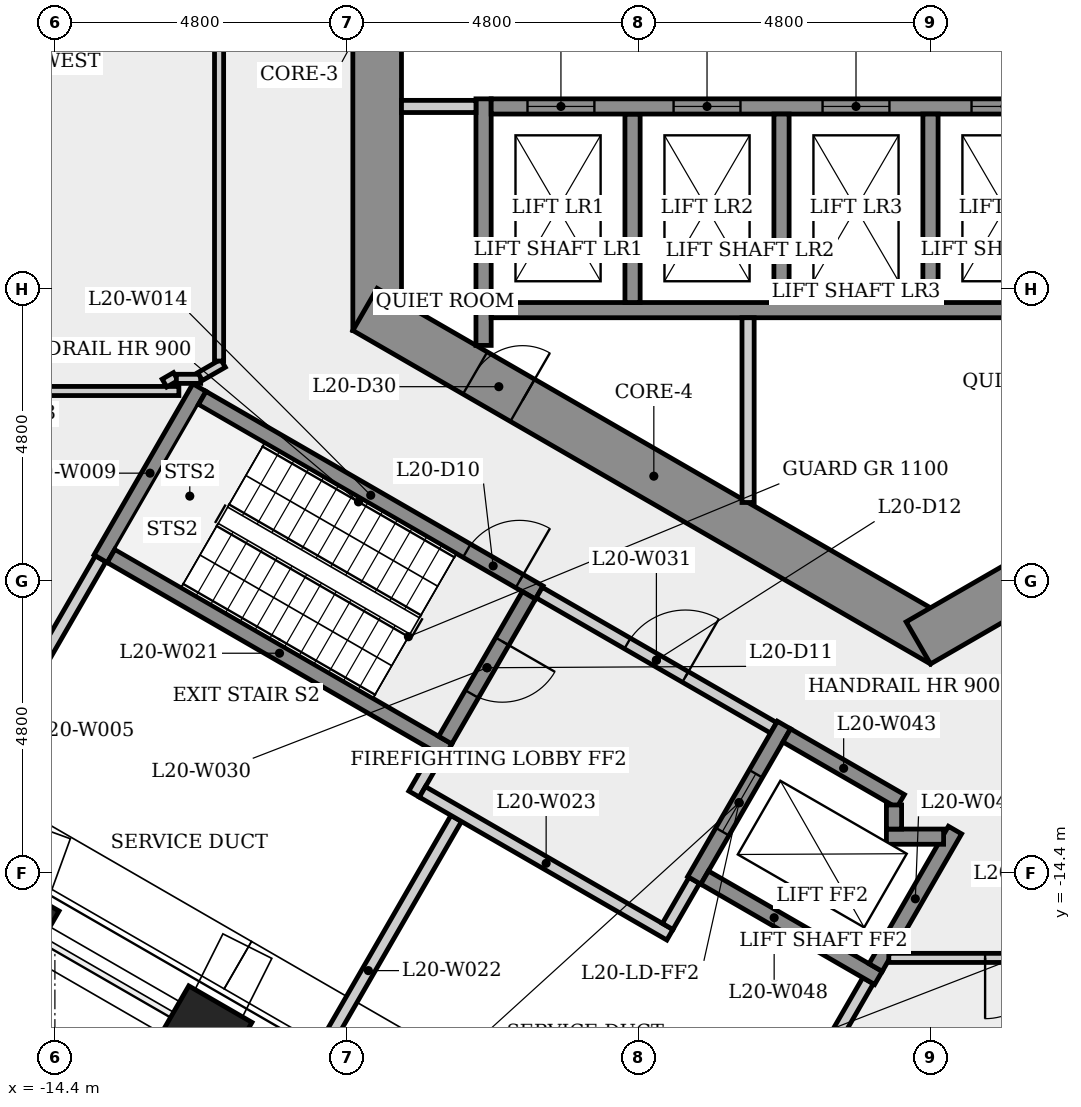
"""IFC4 building model, lengths in metres.
Left out: names, types, materials, properties, quantities, classifications, styles, units other than length and angle.
Written with IfcOpenShell. Run it as: python <this file> out.ifc"""

import sys

from ifc_helpers import new_model, si_unit, direction, frame, frame_2d, origin, origin_2d, place, context, subcontext, project, spatial, rectangle, extrude, element, fill, save


model = new_model("IFC4")
c1 = context("Model", 3, precision=1e-05, world=origin(), true_north=direction((0.0, 1.0)))
c2 = subcontext(c1, "Body", "Model", "MODEL_VIEW")
j1 = project(units=[si_unit("LENGTHUNIT", "METRE"), si_unit("PLANEANGLEUNIT", "RADIAN")], contexts=[c1])
p1 = place(None, origin())
s1 = spatial("IfcSite", under=j1, at=p1, CompositionType="ELEMENT")
p2 = place(p1, origin())
s2 = spatial("IfcBuilding", under=s1, at=p2, CompositionType="ELEMENT")
p3 = place(p2, frame((0.0, 0.0, 78.3)))
s3 = spatial("IfcBuildingStorey", under=s2, at=p3, CompositionType="ELEMENT", Elevation=78.3)
p4 = place(p3, frame((-9.1, 5.485, 0.0), z_axis=(0.0, 0.0, 1.0), x_axis=(0.0, -1.0, 0.0)))
e1 = element("IfcWall", 1, at=p4, inside=s3, PredefinedType="SHEAR", context=c2, shape_type="SweptSolid", body=[
    extrude(rectangle(XDim=10.97, YDim=0.8, at=frame_2d((5.485, 0.0))), origin(), (0.0, 0.0, 1.0), 4.8),
])
p5 = place(p4, frame((4.685, 0.0, 0.0)))
e2 = element("IfcOpeningElement", 2, at=p5, cuts=e1, PredefinedType="OPENING", context=c2, shape_type="SweptSolid", body=[
    extrude(rectangle(XDim=1.6, YDim=2.1, at=frame_2d((0.8, 1.05))), frame((0.0, 0.41, 0.0), z_axis=(0.0, -1.0, 0.0), x_axis=(1.0, 0.0, 0.0)), (0.0, 0.0, 1.0), 0.82),
])
p6 = place(p3, frame((-9.3, -5.138, 0.0), z_axis=(0.0, 0.0, 1.0), x_axis=(0.866023993627, -0.500002442456, 0.0)))
e3 = element("IfcWall", 3, at=p6, inside=s3, PredefinedType="SHEAR", context=c2, shape_type="SweptSolid", body=[
    extrude(rectangle(XDim=10.97, YDim=0.8, at=frame_2d((5.485, 0.0))), origin(), (0.0, 0.0, 1.0), 4.8),
])
p7 = place(p6, frame((2.091, 0.0, 0.0)))
e4 = element("IfcOpeningElement", 4, at=p7, cuts=e3, PredefinedType="OPENING", context=c2, shape_type="SweptSolid", body=[
    extrude(rectangle(XDim=0.9, YDim=2.1, at=frame_2d((0.45, 1.05))), frame((0.0, 0.41, 0.0), z_axis=(0.0, -1.0, 0.0), x_axis=(1.0, 0.0, 0.0)), (0.0, 0.0, 1.0), 0.82),
])
p8 = place(p3, frame((-0.2, -10.623, 0.0), z_axis=(0.0, 0.0, 1.0), x_axis=(0.866023993627, 0.500002442456, 0.0)))
e5 = element("IfcWall", 5, at=p8, inside=s3, PredefinedType="SHEAR", context=c2, shape_type="SweptSolid", body=[
    extrude(rectangle(XDim=10.97, YDim=0.8, at=frame_2d((5.485, 0.0))), origin(), (0.0, 0.0, 1.0), 4.8),
])
p9 = place(p8, frame((4.914, 0.0, 0.0)))
e6 = element("IfcOpeningElement", 6, at=p9, cuts=e5, PredefinedType="OPENING", context=c2, shape_type="SweptSolid", body=[
    extrude(rectangle(XDim=0.9, YDim=2.1, at=frame_2d((0.45, 1.05))), frame((0.0, 0.41, 0.0), z_axis=(0.0, -1.0, 0.0), x_axis=(1.0, 0.0, 0.0)), (0.0, 0.0, 1.0), 0.82),
])
for number, where, z_axis, x_axis in (
    (7, (-15.151, -15.252, 0.0), (0.0, 0.0, 1.0), (-0.5, -0.866, 0.0)),
    (8, (-11.979, -17.084, 0.0), (0.0, 0.0, 1.0), (-0.5, -0.866, 0.0)),
):
    element("IfcColumn", number, at=place(p3, frame(where, z_axis=z_axis, x_axis=x_axis)), inside=s3, PredefinedType="COLUMN", context=c2, shape_type="SweptSolid", body=[
        extrude(rectangle(XDim=1.2, YDim=1.2, at=origin_2d()), origin(), (0.0, 0.0, 1.0), 4.45),
    ])
p10 = place(p3, frame((-18.046, -6.48, 0.0), z_axis=(0.0, 0.0, 1.0), x_axis=(1.0, 0.0, 0.0)))
e9 = element("IfcWall", 9, at=p10, inside=s3, PredefinedType="PARTITIONING", context=c2, shape_type="SweptSolid", body=[
    extrude(rectangle(XDim=5.685, YDim=0.15, at=frame_2d((2.843, 0.0))), origin(), (0.0, 0.0, 1.0), 4.45),
])
p11 = place(p3, frame((-16.926, -14.916, 0.0), z_axis=(0.0, 0.0, 1.0), x_axis=(0.499992165211, 0.866029927155, 0.0)))
e10 = element("IfcWall", 10, at=p11, inside=s3, PredefinedType="PLUMBINGWALL", context=c2, shape_type="SweptSolid", body=[
    extrude(rectangle(XDim=6.556, YDim=0.2, at=frame_2d((3.278, 0.0))), origin(), (0.0, 0.0, 1.0), 4.45),
])
p12 = place(p3, frame((-13.648, -9.239, 0.0), z_axis=(0.0, 0.0, 1.0), x_axis=(0.500017246033, 0.866015446554, 0.0)))
e11 = element("IfcWall", 11, at=p12, inside=s3, PredefinedType="SHEAR", context=c2, shape_type="SweptSolid", body=[
    extrude(rectangle(XDim=3.25, YDim=0.25, at=frame_2d((1.625, 0.0))), origin(), (0.0, 0.0, 1.0), 4.45),
])
p13 = place(p3, frame((-12.598, -6.35, 0.0), z_axis=(0.0, 0.0, 1.0), x_axis=(0.865919906206, 0.500182682664, 0.0)))
e12 = element("IfcWall", 12, at=p13, inside=s3, PredefinedType="PARTITIONING", context=c2, shape_type="SweptSolid", body=[
    extrude(rectangle(XDim=0.214, YDim=0.15, at=frame_2d((0.107, 0.0))), origin(), (0.0, 0.0, 1.0), 4.45),
])
p14 = place(p3, frame((-12.402, -6.28, 0.0), z_axis=(0.0, 0.0, 1.0), x_axis=(1.0, 0.0, 0.0)))
e13 = element("IfcWall", 13, at=p14, inside=s3, PredefinedType="PARTITIONING", context=c2, shape_type="SweptSolid", body=[
    extrude(rectangle(XDim=0.4, YDim=0.15, at=frame_2d((0.2, 0.0))), origin(), (0.0, 0.0, 1.0), 4.45),
])
p15 = place(p3, frame((-11.977, -6.595, 0.0), z_axis=(0.0, 0.0, 1.0), x_axis=(0.866025499775, -0.499999833739, 0.0)))
e14 = element("IfcWall", 14, at=p15, inside=s3, PredefinedType="SHEAR", context=c2, shape_type="SweptSolid", body=[
    extrude(rectangle(XDim=6.4, YDim=0.25, at=frame_2d((3.2, 0.0))), origin(), (0.0, 0.0, 1.0), 4.45),
])
p16 = place(p15, frame((5.025, 0.0, 0.0)))
e15 = element("IfcOpeningElement", 15, at=p16, cuts=e14, PredefinedType="OPENING", context=c2, shape_type="SweptSolid", body=[
    extrude(rectangle(XDim=1.0, YDim=2.1, at=frame_2d((0.5, 1.05))), frame((0.0, 0.135, 0.0), z_axis=(0.0, -1.0, 0.0), x_axis=(1.0, 0.0, 0.0)), (0.0, 0.0, 1.0), 0.27),
])
p17 = place(p3, frame((-12.012, -6.242, 0.0), z_axis=(0.0, 0.0, 1.0), x_axis=(0.866166930732, 0.499754787977, 0.0)))
e16 = element("IfcWall", 16, at=p17, inside=s3, PredefinedType="PARTITIONING", context=c2, shape_type="SweptSolid", body=[
    extrude(rectangle(XDim=0.436, YDim=0.15, at=frame_2d((0.218, 0.0))), origin(), (0.0, 0.0, 1.0), 4.45),
])
p18 = place(p3, frame((-11.7, -5.987, 0.0), z_axis=(0.0, 0.0, 1.0), x_axis=(0.0, 1.0, 0.0)))
e17 = element("IfcWall", 17, at=p18, inside=s3, PredefinedType="PARTITIONING", context=c2, shape_type="SweptSolid", body=[
    extrude(rectangle(XDim=12.125, YDim=0.15, at=frame_2d((6.062, 0.0))), origin(), (0.0, 0.0, 1.0), 4.45),
])
p19 = place(p18, frame((5.225, 0.0, 0.0)))
e18 = element("IfcOpeningElement", 18, at=p19, cuts=e17, PredefinedType="OPENING", context=c2, shape_type="SweptSolid", body=[
    extrude(rectangle(XDim=1.6, YDim=2.1, at=frame_2d((0.8, 1.05))), frame((0.0, 0.085, 0.0), z_axis=(0.0, -1.0, 0.0), x_axis=(1.0, 0.0, 0.0)), (0.0, 0.0, 1.0), 0.17),
])
p20 = place(p3, frame((-8.493, -13.11, 0.0), z_axis=(0.0, 0.0, 1.0), x_axis=(0.500067724834, 0.865986299303, 0.0)))
e19 = element("IfcWall", 19, at=p20, inside=s3, PredefinedType="PLUMBINGWALL", context=c2, shape_type="SweptSolid", body=[
    extrude(rectangle(XDim=0.775, YDim=0.2, at=frame_2d((0.388, 0.0))), origin(), (0.0, 0.0, 1.0), 4.45),
])
p21 = place(p3, frame((-7.935, -12.393, 0.0), z_axis=(0.0, 0.0, 1.0), x_axis=(-0.866025499775, 0.499999833739, 0.0)))
e20 = element("IfcWall", 20, at=p21, inside=s3, PredefinedType="SHEAR", context=c2, shape_type="SweptSolid", body=[
    extrude(rectangle(XDim=6.4, YDim=0.25, at=frame_2d((3.2, 0.0))), origin(), (0.0, 0.0, 1.0), 4.45),
])
p22 = place(p3, frame((-7.8, -13.51, 0.0), z_axis=(0.0, 0.0, 1.0), x_axis=(-0.499982030767, -0.866035778077, 0.0)))
e21 = element("IfcWall", 21, at=p22, inside=s3, PredefinedType="PLUMBINGWALL", context=c2, shape_type="SweptSolid", body=[
    extrude(rectangle(XDim=5.781, YDim=0.2, at=frame_2d((2.89, 0.0))), origin(), (0.0, 0.0, 1.0), 4.45),
])
p23 = place(p3, frame((-8.356, -13.073, 0.0), z_axis=(0.0, 0.0, 1.0), x_axis=(0.866038532462, -0.499977259774, 0.0)))
e22 = element("IfcWall", 22, at=p23, inside=s3, PredefinedType="PLUMBINGWALL", context=c2, shape_type="SweptSolid", body=[
    extrude(rectangle(XDim=4.7, YDim=0.2, at=frame_2d((2.35, 0.0))), origin(), (0.0, 0.0, 1.0), 4.45),
])
p24 = place(p3, frame((-7.35, -5.73, 0.0), z_axis=(0.0, 0.0, 1.0), x_axis=(0.0, 1.0, 0.0)))
e23 = element("IfcWall", 23, at=p24, inside=s3, PredefinedType="SHEAR", context=c2, shape_type="SweptSolid", body=[
    extrude(rectangle(XDim=4.055, YDim=0.25, at=frame_2d((2.028, 0.0))), origin(), (0.0, 0.0, 1.0), 4.45),
])
p25 = place(p3, frame((-7.475, -1.8, 0.0), z_axis=(0.0, 0.0, 1.0), x_axis=(-1.0, 0.0, 0.0)))
e24 = element("IfcWall", 24, at=p25, inside=s3, PredefinedType="PARTITIONING", context=c2, shape_type="SweptSolid", body=[
    extrude(rectangle(XDim=1.225, YDim=0.2, at=frame_2d((0.613, 0.0))), origin(), (0.0, 0.0, 1.0), 4.45),
])
p26 = place(p3, frame((-6.605, -9.841, 0.0), z_axis=(0.0, 0.0, 1.0), x_axis=(-0.499996545922, -0.866027397988, 0.0)))
e25 = element("IfcWall", 25, at=p26, inside=s3, PredefinedType="SHEAR", context=c2, shape_type="SweptSolid", body=[
    extrude(rectangle(XDim=2.75, YDim=0.25, at=frame_2d((1.375, 0.0))), origin(), (0.0, 0.0, 1.0), 4.45),
])
p27 = place(p26, frame((0.875, 0.0, 0.0)))
e26 = element("IfcOpeningElement", 26, at=p27, cuts=e25, PredefinedType="OPENING", context=c2, shape_type="SweptSolid", body=[
    extrude(rectangle(XDim=1.0, YDim=2.1, at=frame_2d((0.5, 1.05))), frame((0.0, 0.135, 0.0), z_axis=(0.0, -1.0, 0.0), x_axis=(1.0, 0.0, 0.0)), (0.0, 0.0, 1.0), 0.27),
])
p28 = place(p3, frame((-6.435, -9.795, 0.0), z_axis=(0.0, 0.0, 1.0), x_axis=(0.866012907634, -0.500021643343, 0.0)))
e27 = element("IfcWall", 27, at=p28, inside=s3, PredefinedType="PARTITIONING", context=c2, shape_type="SweptSolid", body=[
    extrude(rectangle(XDim=4.45, YDim=0.2, at=frame_2d((2.225, 0.0))), origin(), (0.0, 0.0, 1.0), 4.45),
])
p29 = place(p28, frame((1.675, 0.0, 0.0)))
e28 = element("IfcOpeningElement", 28, at=p29, cuts=e27, PredefinedType="OPENING", context=c2, shape_type="SweptSolid", body=[
    extrude(rectangle(XDim=1.1, YDim=2.1, at=frame_2d((0.55, 1.05))), frame((0.0, 0.11, 0.0), z_axis=(0.0, -1.0, 0.0), x_axis=(1.0, 0.0, 0.0)), (0.0, 0.0, 1.0), 0.22),
])
p30 = place(p3, frame((-7.225, -5.15, 0.0), z_axis=(0.0, 0.0, 1.0), x_axis=(1.0, 0.0, 0.0)))
e29 = element("IfcWall", 29, at=p30, inside=s3, PredefinedType="SHEAR", context=c2, shape_type="SweptSolid", body=[
    extrude(rectangle(XDim=14.7, YDim=0.25, at=frame_2d((7.35, 0.0))), origin(), (0.0, 0.0, 1.0), 4.45),
])
p31 = place(p3, frame((-4.9, -1.925, 0.0), z_axis=(0.0, 0.0, 1.0), x_axis=(0.0, -1.0, 0.0)))
e30 = element("IfcWall", 30, at=p31, inside=s3, PredefinedType="SHEAR", context=c2, shape_type="SweptSolid", body=[
    extrude(rectangle(XDim=3.1, YDim=0.25, at=frame_2d((1.55, 0.0))), origin(), (0.0, 0.0, 1.0), 4.8),
])
p32 = place(p3, frame((-7.225, -1.8, 0.0), z_axis=(0.0, 0.0, 1.0), x_axis=(1.0, 0.0, 0.0)))
e31 = element("IfcWall", 31, at=p32, inside=s3, PredefinedType="SHEAR", context=c2, shape_type="SweptSolid", body=[
    extrude(rectangle(XDim=14.7, YDim=0.25, at=frame_2d((7.35, 0.0))), origin(), (0.0, 0.0, 1.0), 4.45),
])
p33 = place(p32, frame((0.597, 0.0, 0.0)))
e32 = element("IfcOpeningElement", 32, at=p33, cuts=e31, PredefinedType="OPENING", context=c2, shape_type="SweptSolid", body=[
    extrude(rectangle(XDim=1.1, YDim=2.1, at=frame_2d((0.55, 1.05))), frame((0.0, 0.135, 0.0), z_axis=(0.0, -1.0, 0.0), x_axis=(1.0, 0.0, 0.0)), (0.0, 0.0, 1.0), 0.27),
])
p34 = place(p32, frame((3.0, 0.0, 0.0)))
e33 = element("IfcOpeningElement", 33, at=p34, cuts=e31, PredefinedType="OPENING", context=c2, shape_type="SweptSolid", body=[
    extrude(rectangle(XDim=1.1, YDim=2.1, at=frame_2d((0.55, 1.05))), frame((0.0, 0.135, 0.0), z_axis=(0.0, -1.0, 0.0), x_axis=(1.0, 0.0, 0.0)), (0.0, 0.0, 1.0), 0.27),
])
p35 = place(p32, frame((5.45, 0.0, 0.0)))
e34 = element("IfcOpeningElement", 34, at=p35, cuts=e31, PredefinedType="OPENING", context=c2, shape_type="SweptSolid", body=[
    extrude(rectangle(XDim=1.1, YDim=2.1, at=frame_2d((0.55, 1.05))), frame((0.0, 0.135, 0.0), z_axis=(0.0, -1.0, 0.0), x_axis=(1.0, 0.0, 0.0)), (0.0, 0.0, 1.0), 0.27),
])
p36 = place(p32, frame((7.9, 0.0, 0.0)))
e35 = element("IfcOpeningElement", 35, at=p36, cuts=e31, PredefinedType="OPENING", context=c2, shape_type="SweptSolid", body=[
    extrude(rectangle(XDim=1.1, YDim=2.1, at=frame_2d((0.55, 1.05))), frame((0.0, 0.135, 0.0), z_axis=(0.0, -1.0, 0.0), x_axis=(1.0, 0.0, 0.0)), (0.0, 0.0, 1.0), 0.27),
])
p37 = place(p32, frame((10.35, 0.0, 0.0)))
e36 = element("IfcOpeningElement", 36, at=p37, cuts=e31, PredefinedType="OPENING", context=c2, shape_type="SweptSolid", body=[
    extrude(rectangle(XDim=1.1, YDim=2.1, at=frame_2d((0.55, 1.05))), frame((0.0, 0.135, 0.0), z_axis=(0.0, -1.0, 0.0), x_axis=(1.0, 0.0, 0.0)), (0.0, 0.0, 1.0), 0.27),
])
p38 = place(p3, frame((-3.885, -14.529, 0.0), z_axis=(0.0, 0.0, 1.0), x_axis=(-0.499859285417, -0.866106630146, 0.0)))
e37 = element("IfcWall", 37, at=p38, inside=s3, PredefinedType="PLUMBINGWALL", context=c2, shape_type="SweptSolid", body=[
    extrude(rectangle(XDim=0.875, YDim=0.2, at=frame_2d((0.438, 0.0))), origin(), (0.0, 0.0, 1.0), 4.45),
])
p39 = place(p3, frame((-3.0, -5.275, 0.0), z_axis=(0.0, 0.0, 1.0), x_axis=(0.0, -1.0, 0.0)))
e38 = element("IfcWall", 38, at=p39, inside=s3, PredefinedType="PARTITIONING", context=c2, shape_type="SweptSolid", body=[
    extrude(rectangle(XDim=3.039, YDim=0.2, at=frame_2d((1.52, 0.0))), origin(), (0.0, 0.0, 1.0), 4.45),
])
p40 = place(p3, frame((-2.41, -11.974, 0.0), z_axis=(0.0, 0.0, 1.0), x_axis=(-0.500001826776, -0.866024349092, 0.0)))
e39 = element("IfcWall", 39, at=p40, inside=s3, PredefinedType="SHEAR", context=c2, shape_type="SweptSolid", body=[
    extrude(rectangle(XDim=2.95, YDim=0.25, at=frame_2d((1.475, 0.0))), origin(), (0.0, 0.0, 1.0), 4.45),
])
p41 = place(p40, frame((0.925, 0.0, 0.0)))
e40 = element("IfcOpeningElement", 40, at=p41, cuts=e39, PredefinedType="OPENING", context=c2, shape_type="SweptSolid", body=[
    extrude(rectangle(XDim=1.1, YDim=2.1, at=frame_2d((0.55, 1.05))), frame((0.0, 0.135, 0.0), z_axis=(0.0, -1.0, 0.0), x_axis=(1.0, 0.0, 0.0)), (0.0, 0.0, 1.0), 0.27),
])
p42 = place(p3, frame((-2.364, -12.145, 0.0), z_axis=(0.0, 0.0, 1.0), x_axis=(0.86603892542, -0.499976579108, 0.0)))
e41 = element("IfcWall", 41, at=p42, inside=s3, PredefinedType="SHEAR", context=c2, shape_type="SweptSolid", body=[
    extrude(rectangle(XDim=2.162, YDim=0.25, at=frame_2d((1.081, 0.0))), origin(), (0.0, 0.0, 1.0), 4.45),
])
p43 = place(p3, frame((-2.45, -1.925, 0.0), z_axis=(0.0, 0.0, 1.0), x_axis=(0.0, -1.0, 0.0)))
e42 = element("IfcWall", 42, at=p43, inside=s3, PredefinedType="SHEAR", context=c2, shape_type="SweptSolid", body=[
    extrude(rectangle(XDim=3.1, YDim=0.25, at=frame_2d((1.55, 0.0))), origin(), (0.0, 0.0, 1.0), 4.8),
])
p44 = place(p3, frame((-1.027, -16.179, 0.0), z_axis=(0.0, 0.0, 1.0), x_axis=(-0.499984476993, -0.866034365811, 0.0)))
e43 = element("IfcWall", 43, at=p44, inside=s3, PredefinedType="PLUMBINGWALL", context=c2, shape_type="SweptSolid", body=[
    extrude(rectangle(XDim=6.856, YDim=0.2, at=frame_2d((3.428, 0.0))), origin(), (0.0, 0.0, 1.0), 4.45),
])
p45 = place(p3, frame((-0.856, -16.133, 0.0), z_axis=(0.0, 0.0, 1.0), x_axis=(-0.866021716278, 0.500006386895, 0.0)))
e44 = element("IfcWall", 44, at=p45, inside=s3, PredefinedType="SHEAR", context=c2, shape_type="SweptSolid", body=[
    extrude(rectangle(XDim=3.3, YDim=0.25, at=frame_2d((1.65, 0.0))), origin(), (0.0, 0.0, 1.0), 4.45),
])
p46 = place(p3, frame((-0.902, -15.962, 0.0), z_axis=(0.0, 0.0, 1.0), x_axis=(0.499981517636, 0.866036074319, 0.0)))
e45 = element("IfcWall", 45, at=p46, inside=s3, PredefinedType="SHEAR", context=c2, shape_type="SweptSolid", body=[
    extrude(rectangle(XDim=2.61, YDim=0.25, at=frame_2d((1.305, 0.0))), origin(), (0.0, 0.0, 1.0), 4.45),
])
p47 = place(p3, frame((-0.725, -13.81, 0.0), z_axis=(0.0, 0.0, 1.0), x_axis=(1.0, 0.0, 0.0)))
e46 = element("IfcWall", 46, at=p47, inside=s3, PredefinedType="SHEAR", context=c2, shape_type="SweptSolid", body=[
    extrude(rectangle(XDim=0.941, YDim=0.25, at=frame_2d((0.47, 0.0))), origin(), (0.0, 0.0, 1.0), 4.8),
])
p48 = place(p3, frame((-0.6, -13.289, 0.0), z_axis=(0.0, 0.0, 1.0), x_axis=(0.0, -1.0, 0.0)))
e47 = element("IfcWall", 47, at=p48, inside=s3, PredefinedType="SHEAR", context=c2, shape_type="SweptSolid", body=[
    extrude(rectangle(XDim=0.396, YDim=0.25, at=frame_2d((0.198, 0.0))), origin(), (0.0, 0.0, 1.0), 4.8),
])
p49 = place(p3, frame((0.0, -1.925, 0.0), z_axis=(0.0, 0.0, 1.0), x_axis=(0.0, -1.0, 0.0)))
e48 = element("IfcWall", 48, at=p49, inside=s3, PredefinedType="SHEAR", context=c2, shape_type="SweptSolid", body=[
    extrude(rectangle(XDim=3.1, YDim=0.25, at=frame_2d((1.55, 0.0))), origin(), (0.0, 0.0, 1.0), 4.8),
])
p50 = place(p3, frame((3.482, -15.804, 0.0), z_axis=(0.0, 0.0, 1.0), x_axis=(-1.0, 0.0, 0.0)))
e49 = element("IfcWall", 49, at=p50, inside=s3, PredefinedType="PARTITIONING", context=c2, shape_type="SweptSolid", body=[
    extrude(rectangle(XDim=4.167, YDim=0.15, at=frame_2d((2.083, 0.0))), origin(), (0.0, 0.0, 1.0), 4.45),
])
p51 = place(p50, frame((1.583, 0.0, 0.0)))
e50 = element("IfcOpeningElement", 50, at=p51, cuts=e49, PredefinedType="OPENING", context=c2, shape_type="SweptSolid", body=[
    extrude(rectangle(XDim=1.0, YDim=2.1, at=frame_2d((0.5, 1.05))), frame((0.0, 0.085, 0.0), z_axis=(0.0, -1.0, 0.0), x_axis=(1.0, 0.0, 0.0)), (0.0, 0.0, 1.0), 0.17),
])
p52 = place(p33, origin())
e51 = element("IfcDoor", 51, at=p52, inside=s3, OperationType="SLIDING_TO_LEFT", PredefinedType="DOOR", context=c2, shape_type="SweptSolid", body=[
    extrude(rectangle(XDim=1.1, YDim=2.1, at=frame_2d((0.55, 1.05))), frame((0.0, 0.025, 0.0), z_axis=(0.0, -1.0, 0.0), x_axis=(1.0, 0.0, 0.0)), (0.0, 0.0, 1.0), 0.05),
])
fill(e32, e51)
p53 = place(p34, origin())
e52 = element("IfcDoor", 52, at=p53, inside=s3, OperationType="SLIDING_TO_LEFT", PredefinedType="DOOR", context=c2, shape_type="SweptSolid", body=[
    extrude(rectangle(XDim=1.1, YDim=2.1, at=frame_2d((0.55, 1.05))), frame((0.0, 0.025, 0.0), z_axis=(0.0, -1.0, 0.0), x_axis=(1.0, 0.0, 0.0)), (0.0, 0.0, 1.0), 0.05),
])
fill(e33, e52)
p54 = place(p35, origin())
e53 = element("IfcDoor", 53, at=p54, inside=s3, OperationType="SLIDING_TO_LEFT", PredefinedType="DOOR", context=c2, shape_type="SweptSolid", body=[
    extrude(rectangle(XDim=1.1, YDim=2.1, at=frame_2d((0.55, 1.05))), frame((0.0, 0.025, 0.0), z_axis=(0.0, -1.0, 0.0), x_axis=(1.0, 0.0, 0.0)), (0.0, 0.0, 1.0), 0.05),
])
fill(e34, e53)
p55 = place(p36, origin())
e54 = element("IfcDoor", 54, at=p55, inside=s3, OperationType="SLIDING_TO_LEFT", PredefinedType="DOOR", context=c2, shape_type="SweptSolid", body=[
    extrude(rectangle(XDim=1.1, YDim=2.1, at=frame_2d((0.55, 1.05))), frame((0.0, 0.025, 0.0), z_axis=(0.0, -1.0, 0.0), x_axis=(1.0, 0.0, 0.0)), (0.0, 0.0, 1.0), 0.05),
])
fill(e35, e54)
p56 = place(p16, origin())
e55 = element("IfcDoor", 55, at=p56, inside=s3, OperationType="SINGLE_SWING_RIGHT", PredefinedType="DOOR", context=c2, shape_type="SweptSolid", body=[
    extrude(rectangle(XDim=1.0, YDim=2.1, at=frame_2d((0.5, 1.05))), frame((0.0, 0.025, 0.0), z_axis=(0.0, -1.0, 0.0), x_axis=(1.0, 0.0, 0.0)), (0.0, 0.0, 1.0), 0.05),
])
fill(e15, e55)
p57 = place(p27, origin())
e56 = element("IfcDoor", 56, at=p57, inside=s3, OperationType="SINGLE_SWING_LEFT", PredefinedType="DOOR", context=c2, shape_type="SweptSolid", body=[
    extrude(rectangle(XDim=1.0, YDim=2.1, at=frame_2d((0.5, 1.05))), frame((0.0, 0.025, 0.0), z_axis=(0.0, -1.0, 0.0), x_axis=(1.0, 0.0, 0.0)), (0.0, 0.0, 1.0), 0.05),
])
fill(e26, e56)
p58 = place(p29, origin())
e57 = element("IfcDoor", 57, at=p58, inside=s3, OperationType="SINGLE_SWING_RIGHT", PredefinedType="DOOR", context=c2, shape_type="SweptSolid", body=[
    extrude(rectangle(XDim=1.1, YDim=2.1, at=frame_2d((0.55, 1.05))), frame((0.0, 0.025, 0.0), z_axis=(0.0, -1.0, 0.0), x_axis=(1.0, 0.0, 0.0)), (0.0, 0.0, 1.0), 0.05),
])
fill(e28, e57)
p59 = place(p41, origin())
e58 = element("IfcDoor", 58, at=p59, inside=s3, OperationType="SLIDING_TO_LEFT", PredefinedType="DOOR", context=c2, shape_type="SweptSolid", body=[
    extrude(rectangle(XDim=1.1, YDim=2.1, at=frame_2d((0.55, 1.05))), frame((0.0, 0.025, 0.0), z_axis=(0.0, -1.0, 0.0), x_axis=(1.0, 0.0, 0.0)), (0.0, 0.0, 1.0), 0.05),
])
fill(e40, e58)
p60 = place(p51, origin())
e59 = element("IfcDoor", 59, at=p60, inside=s3, OperationType="SINGLE_SWING_RIGHT", PredefinedType="DOOR", context=c2, shape_type="SweptSolid", body=[
    extrude(rectangle(XDim=1.0, YDim=2.1, at=frame_2d((0.5, 1.05))), frame((0.0, 0.025, 0.0), z_axis=(0.0, -1.0, 0.0), x_axis=(1.0, 0.0, 0.0)), (0.0, 0.0, 1.0), 0.05),
])
fill(e50, e59)
p61 = place(p7, origin())
e60 = element("IfcDoor", 60, at=p61, inside=s3, OperationType="SINGLE_SWING_RIGHT", PredefinedType="DOOR", context=c2, shape_type="SweptSolid", body=[
    extrude(rectangle(XDim=0.9, YDim=2.1, at=frame_2d((0.45, 1.05))), frame((0.0, 0.025, 0.0), z_axis=(0.0, -1.0, 0.0), x_axis=(1.0, 0.0, 0.0)), (0.0, 0.0, 1.0), 0.05),
])
fill(e4, e60)
save(model, sys.argv[1])
